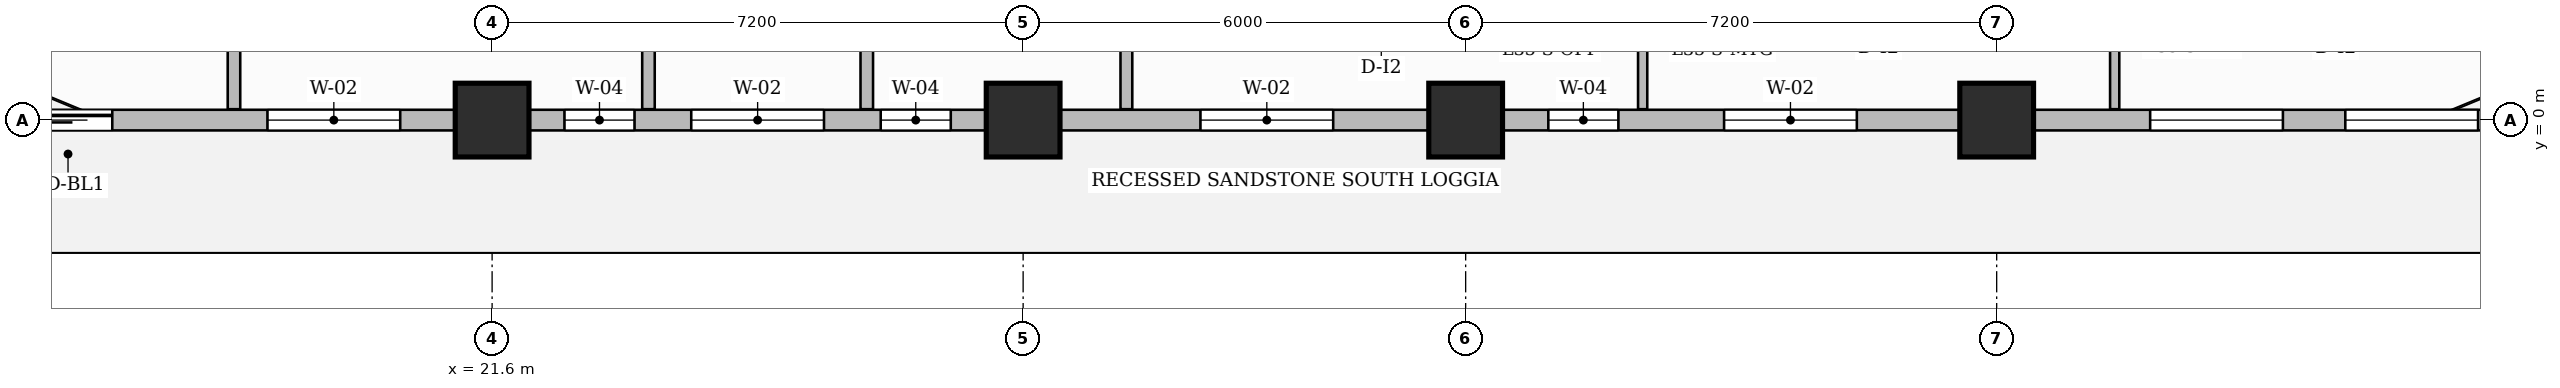
"""IFC4 building model, lengths in metres.
Left out: names, types, materials, properties, quantities, classifications, styles, units other than length and angle.
Written with IfcOpenShell. Run it as: python <this file> out.ifc"""

import sys

from ifc_helpers import new_model, si_unit, direction, frame, frame_2d, origin, origin_2d, place, context, subcontext, project, spatial, rectangle, extrude, source, transform, mapped, element, fill, save


model = new_model("IFC4")
c1 = context("Model", 3, precision=1e-05, world=origin(), true_north=direction((0.0, 1.0)))
c2 = subcontext(c1, "Body", "Model", "MODEL_VIEW")
j1 = project(units=[si_unit("LENGTHUNIT", "METRE"), si_unit("PLANEANGLEUNIT", "RADIAN")], contexts=[c1])
p1 = place(None, origin())
s1 = spatial("IfcSite", under=j1, at=p1, CompositionType="ELEMENT")
p2 = place(p1, origin())
s2 = spatial("IfcBuilding", under=s1, at=p2, CompositionType="ELEMENT")
p3 = place(p2, frame((0.0, 0.0, 141.4)))
s3 = spatial("IfcBuildingStorey", under=s2, at=p3, CompositionType="ELEMENT", Elevation=141.4)
m1 = source(origin(), c2, "Body", "SweptSolid", [
    extrude(rectangle(XDim=1.0, YDim=1.0, at=origin_2d()), origin(), (0.0, 0.0, 1.0), 3.7),
])
for number, where, z_axis, x_axis in (
    (1, (21.6, 0.0, 0.0), (0.0, 0.0, 1.0), (1.0, 0.0, 0.0)),
    (2, (28.8, 0.0, 0.0), (0.0, 0.0, 1.0), (1.0, 0.0, 0.0)),
    (3, (34.8, 0.0, 0.0), (0.0, 0.0, 1.0), (1.0, 0.0, 0.0)),
    (4, (42.0, 0.0, 0.0), (0.0, 0.0, 1.0), (1.0, 0.0, 0.0)),
):
    element("IfcColumn", number, at=place(p3, frame(where, z_axis=z_axis, x_axis=x_axis)), inside=s3, PredefinedType="COLUMN", context=c2, shape_type="MappedRepresentation", body=[
        mapped(m1, transform((0.0, 0.0, 0.0), scale=1.0)),
    ])
p4 = place(p3, frame((30.2, 0.148, 0.0), z_axis=(0.0, 0.0, 1.0), x_axis=(0.0, 1.0, 0.0)))
e5 = element("IfcWall", 5, at=p4, inside=s3, PredefinedType="PARTITIONING", context=c2, shape_type="SweptSolid", body=[
    extrude(rectangle(XDim=9.912, YDim=0.16, at=frame_2d((4.956, 0.0))), origin(), (0.0, 0.0, 1.0), 3.4),
])
p5 = place(p4, frame((1.977, 0.0, 0.0)))
e6 = element("IfcOpeningElement", 6, at=p5, cuts=e5, PredefinedType="OPENING", context=c2, shape_type="SweptSolid", body=[
    extrude(rectangle(XDim=1.05, YDim=2.15, at=frame_2d((0.525, 1.075))), frame((0.0, 0.09, 0.0), z_axis=(0.0, -1.0, 0.0), x_axis=(1.0, 0.0, 0.0)), (0.0, 0.0, 1.0), 0.18),
])
for number, where, z_axis, x_axis in (
    (7, (37.2, 0.148, 0.0), (0.0, 0.0, 1.0), (0.0, 1.0, 0.0)),
    (8, (43.6, 0.148, 0.0), (0.0, 0.0, 1.0), (0.0, 1.0, 0.0)),
):
    element("IfcWall", number, at=place(p3, frame(where, z_axis=z_axis, x_axis=x_axis)), inside=s3, PredefinedType="PARTITIONING", context=c2, shape_type="SweptSolid", body=[
        extrude(rectangle(XDim=1.562, YDim=0.125, at=frame_2d((0.781, 0.0))), origin(), (0.0, 0.0, 1.0), 3.4),
    ])
p6 = place(p3, frame((18.1, 0.148, 0.0), z_axis=(0.0, 0.0, 1.0), x_axis=(0.0, 1.0, 0.0)))
e9 = element("IfcWall", 9, at=p6, inside=s3, PredefinedType="PARTITIONING", context=c2, shape_type="SweptSolid", body=[
    extrude(rectangle(XDim=9.912, YDim=0.17, at=frame_2d((4.956, 0.0))), origin(), (0.0, 0.0, 1.0), 3.055),
])
for number, where, z_axis, x_axis in (
    (10, (23.72, 0.148, 0.0), (0.0, 0.0, 1.0), (0.0, 1.0, 0.0)),
    (11, (26.68, 0.148, 0.0), (0.0, 0.0, 1.0), (0.0, 1.0, 0.0)),
):
    element("IfcWall", number, at=place(p3, frame(where, z_axis=z_axis, x_axis=x_axis)), inside=s3, PredefinedType="PARTITIONING", context=c2, shape_type="SweptSolid", body=[
        extrude(rectangle(XDim=9.912, YDim=0.17, at=frame_2d((4.956, 0.0))), origin(), (0.0, 0.0, 1.0), 3.4),
    ])
p7 = place(p3, frame((14.4, 0.0, 0.0), z_axis=(0.0, 0.0, 1.0), x_axis=(1.0, 0.0, 0.0)))
e12 = element("IfcWall", 12, at=p7, inside=s3, PredefinedType="SOLIDWALL", context=c2, shape_type="SweptSolid", body=[
    extrude(rectangle(XDim=35.4, YDim=0.28, at=frame_2d((17.7, 0.0))), origin(), (0.0, 0.0, 1.0), 2.885),
])
p8 = place(p7, frame((0.85, 0.0, 0.0)))
e13 = element("IfcOpeningElement", 13, at=p8, cuts=e12, PredefinedType="OPENING", context=c2, shape_type="SweptSolid", body=[
    extrude(rectangle(XDim=1.2, YDim=2.2, at=frame_2d((0.6, 1.1))), frame((0.0, 0.15, 0.0), z_axis=(0.0, -1.0, 0.0), x_axis=(1.0, 0.0, 0.0)), (0.0, 0.0, 1.0), 0.3),
])
p9 = place(p7, frame((4.154, 0.0, 0.8)))
e14 = element("IfcOpeningElement", 14, at=p9, cuts=e12, PredefinedType="OPENING", context=c2, shape_type="SweptSolid", body=[
    extrude(rectangle(XDim=1.8, YDim=1.85, at=frame_2d((0.9, 0.925))), frame((0.0, 0.15, 0.0), z_axis=(0.0, -1.0, 0.0), x_axis=(1.0, 0.0, 0.0)), (0.0, 0.0, 1.0), 0.3),
])
p10 = place(p7, frame((8.181, 0.0, 0.8)))
e15 = element("IfcOpeningElement", 15, at=p10, cuts=e12, PredefinedType="OPENING", context=c2, shape_type="SweptSolid", body=[
    extrude(rectangle(XDim=0.95, YDim=1.75, at=frame_2d((0.475, 0.875))), frame((0.0, 0.15, 0.0), z_axis=(0.0, -1.0, 0.0), x_axis=(1.0, 0.0, 0.0)), (0.0, 0.0, 1.0), 0.3),
])
p11 = place(p7, frame((9.9, 0.0, 0.8)))
e16 = element("IfcOpeningElement", 16, at=p11, cuts=e12, PredefinedType="OPENING", context=c2, shape_type="SweptSolid", body=[
    extrude(rectangle(XDim=1.8, YDim=1.85, at=frame_2d((0.9, 0.925))), frame((0.0, 0.15, 0.0), z_axis=(0.0, -1.0, 0.0), x_axis=(1.0, 0.0, 0.0)), (0.0, 0.0, 1.0), 0.3),
])
p12 = place(p7, frame((12.469, 0.0, 0.8)))
e17 = element("IfcOpeningElement", 17, at=p12, cuts=e12, PredefinedType="OPENING", context=c2, shape_type="SweptSolid", body=[
    extrude(rectangle(XDim=0.95, YDim=1.75, at=frame_2d((0.475, 0.875))), frame((0.0, 0.15, 0.0), z_axis=(0.0, -1.0, 0.0), x_axis=(1.0, 0.0, 0.0)), (0.0, 0.0, 1.0), 0.3),
])
p13 = place(p7, frame((16.804, 0.0, 0.8)))
e18 = element("IfcOpeningElement", 18, at=p13, cuts=e12, PredefinedType="OPENING", context=c2, shape_type="SweptSolid", body=[
    extrude(rectangle(XDim=1.8, YDim=1.85, at=frame_2d((0.9, 0.925))), frame((0.0, 0.15, 0.0), z_axis=(0.0, -1.0, 0.0), x_axis=(1.0, 0.0, 0.0)), (0.0, 0.0, 1.0), 0.3),
])
p14 = place(p7, frame((21.521, 0.0, 0.8)))
e19 = element("IfcOpeningElement", 19, at=p14, cuts=e12, PredefinedType="OPENING", context=c2, shape_type="SweptSolid", body=[
    extrude(rectangle(XDim=0.95, YDim=1.75, at=frame_2d((0.475, 0.875))), frame((0.0, 0.15, 0.0), z_axis=(0.0, -1.0, 0.0), x_axis=(1.0, 0.0, 0.0)), (0.0, 0.0, 1.0), 0.3),
])
p15 = place(p7, frame((23.904, 0.0, 0.8)))
e20 = element("IfcOpeningElement", 20, at=p15, cuts=e12, PredefinedType="OPENING", context=c2, shape_type="SweptSolid", body=[
    extrude(rectangle(XDim=1.8, YDim=1.85, at=frame_2d((0.9, 0.925))), frame((0.0, 0.15, 0.0), z_axis=(0.0, -1.0, 0.0), x_axis=(1.0, 0.0, 0.0)), (0.0, 0.0, 1.0), 0.3),
])
p16 = place(p7, frame((29.681, 0.0, 0.8)))
e21 = element("IfcOpeningElement", 21, at=p16, cuts=e12, PredefinedType="OPENING", context=c2, shape_type="SweptSolid", body=[
    extrude(rectangle(XDim=1.8, YDim=1.85, at=frame_2d((0.9, 0.925))), frame((0.0, 0.15, 0.0), z_axis=(0.0, -1.0, 0.0), x_axis=(1.0, 0.0, 0.0)), (0.0, 0.0, 1.0), 0.3),
])
p17 = place(p7, frame((32.327, 0.0, 0.8)))
e22 = element("IfcOpeningElement", 22, at=p17, cuts=e12, PredefinedType="OPENING", context=c2, shape_type="SweptSolid", body=[
    extrude(rectangle(XDim=1.8, YDim=1.85, at=frame_2d((0.9, 0.925))), frame((0.0, 0.15, 0.0), z_axis=(0.0, -1.0, 0.0), x_axis=(1.0, 0.0, 0.0)), (0.0, 0.0, 1.0), 0.3),
])
m2 = source(origin(), c2, "Body", "SweptSolid", [
    extrude(rectangle(XDim=1.2, YDim=2.2, at=frame_2d((0.6, 1.1))), frame((0.0, 0.025, 0.0), z_axis=(0.0, -1.0, 0.0), x_axis=(1.0, 0.0, 0.0)), (0.0, 0.0, 1.0), 0.05),
])
p18 = place(p8, origin())
e23 = element("IfcDoor", 23, at=p18, inside=s3, OperationType="SLIDING_TO_LEFT", PredefinedType="DOOR", context=c2, shape_type="MappedRepresentation", body=[
    mapped(m2, transform((0.0, 0.0, 0.0), scale=1.0)),
])
fill(e13, e23)
m3 = source(origin(), c2, "Body", "SweptSolid", [
    extrude(rectangle(XDim=1.8, YDim=1.85, at=frame_2d((0.9, 0.925))), frame((0.0, 0.03, 0.0), z_axis=(0.0, -1.0, 0.0), x_axis=(1.0, 0.0, 0.0)), (0.0, 0.0, 1.0), 0.06),
])
p19 = place(p9, origin())
e24 = element("IfcWindow", 24, at=p19, inside=s3, PartitioningType="DOUBLE_PANEL_VERTICAL", PredefinedType="WINDOW", context=c2, shape_type="MappedRepresentation", body=[
    mapped(m3, transform((0.0, 0.0, 0.0), scale=1.0)),
])
fill(e14, e24)
m4 = source(origin(), c2, "Body", "SweptSolid", [
    extrude(rectangle(XDim=0.95, YDim=1.75, at=frame_2d((0.475, 0.875))), frame((0.0, 0.03, 0.0), z_axis=(0.0, -1.0, 0.0), x_axis=(1.0, 0.0, 0.0)), (0.0, 0.0, 1.0), 0.06),
])
p20 = place(p10, origin())
e25 = element("IfcWindow", 25, at=p20, inside=s3, PartitioningType="SINGLE_PANEL", PredefinedType="WINDOW", context=c2, shape_type="MappedRepresentation", body=[
    mapped(m4, transform((0.0, 0.0, 0.0), scale=1.0)),
])
fill(e15, e25)
p21 = place(p11, origin())
e26 = element("IfcWindow", 26, at=p21, inside=s3, PartitioningType="DOUBLE_PANEL_VERTICAL", PredefinedType="WINDOW", context=c2, shape_type="MappedRepresentation", body=[
    mapped(m3, transform((0.0, 0.0, 0.0), scale=1.0)),
])
fill(e16, e26)
p22 = place(p12, origin())
e27 = element("IfcWindow", 27, at=p22, inside=s3, PartitioningType="SINGLE_PANEL", PredefinedType="WINDOW", context=c2, shape_type="MappedRepresentation", body=[
    mapped(m4, transform((0.0, 0.0, 0.0), scale=1.0)),
])
fill(e17, e27)
p23 = place(p13, origin())
e28 = element("IfcWindow", 28, at=p23, inside=s3, PartitioningType="DOUBLE_PANEL_VERTICAL", PredefinedType="WINDOW", context=c2, shape_type="MappedRepresentation", body=[
    mapped(m3, transform((0.0, 0.0, 0.0), scale=1.0)),
])
fill(e18, e28)
p24 = place(p14, origin())
e29 = element("IfcWindow", 29, at=p24, inside=s3, PartitioningType="SINGLE_PANEL", PredefinedType="WINDOW", context=c2, shape_type="MappedRepresentation", body=[
    mapped(m4, transform((0.0, 0.0, 0.0), scale=1.0)),
])
fill(e19, e29)
p25 = place(p15, origin())
e30 = element("IfcWindow", 30, at=p25, inside=s3, PartitioningType="DOUBLE_PANEL_VERTICAL", PredefinedType="WINDOW", context=c2, shape_type="MappedRepresentation", body=[
    mapped(m3, transform((0.0, 0.0, 0.0), scale=1.0)),
])
fill(e20, e30)
p26 = place(p16, origin())
e31 = element("IfcWindow", 31, at=p26, inside=s3, PartitioningType="DOUBLE_PANEL_VERTICAL", PredefinedType="WINDOW", context=c2, shape_type="MappedRepresentation", body=[
    mapped(m3, transform((0.0, 0.0, 0.0), scale=1.0)),
])
fill(e21, e31)
p27 = place(p17, origin())
e32 = element("IfcWindow", 32, at=p27, inside=s3, PartitioningType="DOUBLE_PANEL_VERTICAL", PredefinedType="WINDOW", context=c2, shape_type="MappedRepresentation", body=[
    mapped(m3, transform((0.0, 0.0, 0.0), scale=1.0)),
])
fill(e22, e32)
save(model, sys.argv[1])
